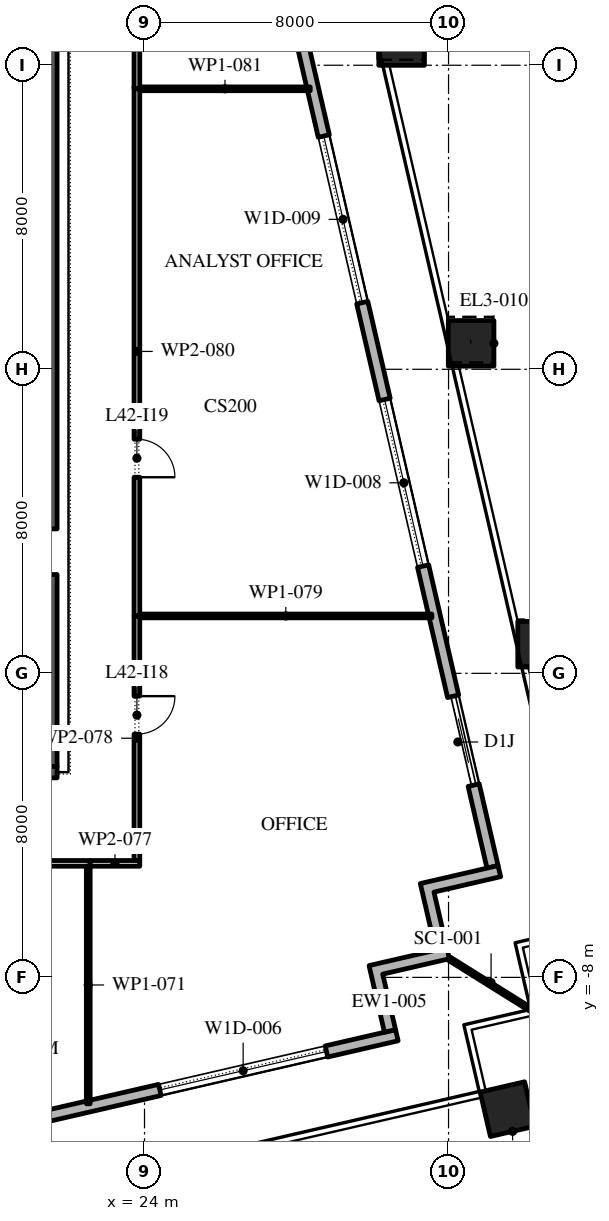
"""IFC4 building model, lengths in metres.
Left out: names, types, materials, properties, quantities, classifications, styles, units other than length and angle.
Written with IfcOpenShell. Run it as: python <this file> out.ifc"""

import sys

from ifc_helpers import new_model, si_unit, direction, frame, frame_2d, origin, origin_2d, place, context, subcontext, project, spatial, polyline, rectangle, outline, extrude, element, fill, save


model = new_model("IFC4")
c1 = context("Model", 3, precision=1e-05, world=origin(), true_north=direction((0.0, 1.0)))
c2 = subcontext(c1, "Body", "Model", "MODEL_VIEW")
j1 = project(units=[si_unit("LENGTHUNIT", "METRE"), si_unit("PLANEANGLEUNIT", "RADIAN")], contexts=[c1])
p1 = place(None, origin())
s1 = spatial("IfcSite", under=j1, at=p1, CompositionType="ELEMENT")
p2 = place(p1, origin())
s2 = spatial("IfcBuilding", under=s1, at=p2, CompositionType="ELEMENT")
p3 = place(p2, frame((0.0, 0.0, 192.6)))
s3 = spatial("IfcBuildingStorey", under=s2, at=p3, CompositionType="ELEMENT", Elevation=192.6)
p4 = place(p3, frame((33.551, -11.467, 0.0), z_axis=(0.0, 0.0, 1.0), x_axis=(0.974370064785, 0.224951054344, 0.0)))
e1 = element("IfcColumn", 1, at=p4, inside=s3, PredefinedType="COLUMN", context=c2, shape_type="SweptSolid", body=[
    extrude(rectangle(XDim=1.2, YDim=1.2, at=origin_2d()), origin(), (0.0, 0.0, 1.0), 4.2),
])
p5 = place(p3, frame((34.422, 0.767, 0.0), z_axis=(-0.00267376016, 0.011683169396, 0.9999281747), x_axis=(-0.974798272484, -0.223088161862, 0.0)))
e2 = element("IfcColumn", 2, at=p5, inside=s3, PredefinedType="COLUMN", context=c2, shape_type="SweptSolid", body=[
    extrude(rectangle(XDim=1.2, YDim=1.2, at=origin_2d()), origin(), (0.0, 0.0, 1.0), 4.2),
])
p6 = place(p3, frame((32.594, 8.683, 0.0), z_axis=(-0.005346368472, 0.023361305716, 0.999712791625), x_axis=(-0.974798272484, -0.223088161862, 0.0)))
e3 = element("IfcColumn", 3, at=p6, inside=s3, PredefinedType="COLUMN", context=c2, shape_type="SweptSolid", body=[
    extrude(rectangle(XDim=1.2, YDim=1.2, at=origin_2d()), origin(), (0.0, 0.0, 1.0), 4.201),
])
p7 = place(p3, frame((30.767, 16.598, 0.0), z_axis=(-0.0080747472, 0.035087390713, 0.999351626541), x_axis=(-0.974526982896, -0.224270282488, 0.0)))
e4 = element("IfcColumn", 4, at=p7, inside=s3, PredefinedType="COLUMN", context=c2, shape_type="SweptSolid", body=[
    extrude(rectangle(XDim=1.2, YDim=1.2, at=origin_2d()), origin(), (0.0, 0.0, 1.0), 4.203),
])
p8 = place(p3, frame((-17.592, -20.657, 0.0), z_axis=(0.0, 0.0, 1.0), x_axis=(0.974370243697, 0.224950279389, 0.0)))
e5 = element("IfcWall", 5, at=p8, inside=s3, PredefinedType="STANDARD", context=c2, shape_type="SweptSolid", body=[
    extrude(rectangle(XDim=49.5, YDim=0.3, at=frame_2d((24.75, 0.0))), origin(), (0.0, 0.0, 1.0), 4.0),
])
p9 = place(p8, frame((2.8, 0.0, 0.0)))
e6 = element("IfcOpeningElement", 6, at=p9, cuts=e5, PredefinedType="OPENING", context=c2, shape_type="SweptSolid", body=[
    extrude(rectangle(XDim=2.4, YDim=3.5, at=frame_2d((1.2, 1.75))), frame((0.0, 0.16, 0.0), z_axis=(0.0, -1.0, 0.0), x_axis=(1.0, 0.0, 0.0)), (0.0, 0.0, 1.0), 0.32),
])
p10 = place(p8, frame((9.9, 0.0, 0.45)))
e7 = element("IfcOpeningElement", 7, at=p10, cuts=e5, PredefinedType="OPENING", context=c2, shape_type="SweptSolid", body=[
    extrude(rectangle(XDim=4.5, YDim=2.575, at=frame_2d((2.25, 1.288))), frame((0.0, 0.16, 0.0), z_axis=(0.0, -1.0, 0.0), x_axis=(1.0, 0.0, 0.0)), (0.0, 0.0, 1.0), 0.32),
])
p11 = place(p8, frame((18.2, 0.0, 0.45)))
e8 = element("IfcOpeningElement", 8, at=p11, cuts=e5, PredefinedType="OPENING", context=c2, shape_type="SweptSolid", body=[
    extrude(rectangle(XDim=4.5, YDim=3.05, at=frame_2d((2.25, 1.525))), frame((0.0, 0.16, 0.0), z_axis=(0.0, -1.0, 0.0), x_axis=(1.0, 0.0, 0.0)), (0.0, 0.0, 1.0), 0.32),
])
p12 = place(p8, frame((26.5, 0.0, 0.45)))
e9 = element("IfcOpeningElement", 9, at=p12, cuts=e5, PredefinedType="OPENING", context=c2, shape_type="SweptSolid", body=[
    extrude(rectangle(XDim=4.5, YDim=2.75, at=frame_2d((2.25, 1.375))), frame((0.0, 0.16, 0.0), z_axis=(0.0, -1.0, 0.0), x_axis=(1.0, 0.0, 0.0)), (0.0, 0.0, 1.0), 0.32),
])
p13 = place(p8, frame((35.85, 0.0, 0.0)))
e10 = element("IfcOpeningElement", 10, at=p13, cuts=e5, PredefinedType="OPENING", context=c2, shape_type="SweptSolid", body=[
    extrude(rectangle(XDim=2.4, YDim=3.5, at=frame_2d((1.2, 1.75))), frame((0.0, 0.16, 0.0), z_axis=(0.0, -1.0, 0.0), x_axis=(1.0, 0.0, 0.0)), (0.0, 0.0, 1.0), 0.32),
])
p14 = place(p8, frame((43.1, 0.0, 0.45)))
e11 = element("IfcOpeningElement", 11, at=p14, cuts=e5, PredefinedType="OPENING", context=c2, shape_type="SweptSolid", body=[
    extrude(rectangle(XDim=4.5, YDim=2.875, at=frame_2d((2.25, 1.438))), frame((0.0, 0.16, 0.0), z_axis=(0.0, -1.0, 0.0), x_axis=(1.0, 0.0, 0.0)), (0.0, 0.0, 1.0), 0.32),
])
p15 = place(p3, frame((33.157, -5.092, 0.0), z_axis=(0.0, 0.0, 1.0), x_axis=(-0.224950279389, 0.974370243697, 0.0)))
e12 = element("IfcWall", 12, at=p15, inside=s3, PredefinedType="STANDARD", context=c2, shape_type="SweptSolid", body=[
    extrude(rectangle(XDim=49.5, YDim=0.3, at=frame_2d((24.75, 0.0))), origin(), (0.0, 0.0, 1.0), 4.0),
])
p16 = place(p15, frame((2.207, 0.0, 0.0)))
e13 = element("IfcOpeningElement", 13, at=p16, cuts=e12, PredefinedType="OPENING", context=c2, shape_type="SweptSolid", body=[
    extrude(rectangle(XDim=2.4, YDim=3.125, at=frame_2d((1.2, 1.562))), frame((0.0, 0.16, 0.0), z_axis=(0.0, -1.0, 0.0), x_axis=(1.0, 0.0, 0.0)), (0.0, 0.0, 1.0), 0.32),
])
p17 = place(p15, frame((8.121, 0.0, 0.45)))
e14 = element("IfcOpeningElement", 14, at=p17, cuts=e12, PredefinedType="OPENING", context=c2, shape_type="SweptSolid", body=[
    extrude(rectangle(XDim=4.5, YDim=2.875, at=frame_2d((2.25, 1.438))), frame((0.0, 0.16, 0.0), z_axis=(0.0, -1.0, 0.0), x_axis=(1.0, 0.0, 0.0)), (0.0, 0.0, 1.0), 0.32),
])
p18 = place(p15, frame((15.236, 0.0, 0.45)))
e15 = element("IfcOpeningElement", 15, at=p18, cuts=e12, PredefinedType="OPENING", context=c2, shape_type="SweptSolid", body=[
    extrude(rectangle(XDim=4.5, YDim=2.875, at=frame_2d((2.25, 1.438))), frame((0.0, 0.16, 0.0), z_axis=(0.0, -1.0, 0.0), x_axis=(1.0, 0.0, 0.0)), (0.0, 0.0, 1.0), 0.32),
])
p19 = place(p15, frame((22.35, 0.0, 0.45)))
e16 = element("IfcOpeningElement", 16, at=p19, cuts=e12, PredefinedType="OPENING", context=c2, shape_type="SweptSolid", body=[
    extrude(rectangle(XDim=4.5, YDim=3.0, at=frame_2d((2.25, 1.5))), frame((0.0, 0.16, 0.0), z_axis=(0.0, -1.0, 0.0), x_axis=(1.0, 0.0, 0.0)), (0.0, 0.0, 1.0), 0.32),
])
p20 = place(p15, frame((30.514, 0.0, 0.0)))
e17 = element("IfcOpeningElement", 17, at=p20, cuts=e12, PredefinedType="OPENING", context=c2, shape_type="SweptSolid", body=[
    extrude(rectangle(XDim=2.4, YDim=3.45, at=frame_2d((1.2, 1.725))), frame((0.0, 0.16, 0.0), z_axis=(0.0, -1.0, 0.0), x_axis=(1.0, 0.0, 0.0)), (0.0, 0.0, 1.0), 0.32),
])
p21 = place(p15, frame((36.579, 0.0, 0.45)))
e18 = element("IfcOpeningElement", 18, at=p21, cuts=e12, PredefinedType="OPENING", context=c2, shape_type="SweptSolid", body=[
    extrude(rectangle(XDim=4.5, YDim=3.05, at=frame_2d((2.25, 1.525))), frame((0.0, 0.16, 0.0), z_axis=(0.0, -1.0, 0.0), x_axis=(1.0, 0.0, 0.0)), (0.0, 0.0, 1.0), 0.32),
])
p22 = place(p15, frame((43.693, 0.0, 0.45)))
e19 = element("IfcOpeningElement", 19, at=p22, cuts=e12, PredefinedType="OPENING", context=c2, shape_type="SweptSolid", body=[
    extrude(rectangle(XDim=4.5, YDim=3.05, at=frame_2d((2.25, 1.525))), frame((0.0, 0.16, 0.0), z_axis=(0.0, -1.0, 0.0), x_axis=(1.0, 0.0, 0.0)), (0.0, 0.0, 1.0), 0.32),
])
p23 = place(p3, origin())
e20 = element("IfcWall", 20, at=p23, inside=s3, PredefinedType="STANDARD", context=c2, shape_type="SweptSolid", body=[
    extrude(outline(polyline([(31.662, -7.285), (31.257, -5.531), (33.303, -5.058), (33.371, -5.351), (31.617, -5.756), (32.022, -7.51), (30.268, -7.914), (30.605, -9.376), (30.313, -9.443), (29.908, -7.69), (31.662, -7.285)])), origin(), (0.0, 0.0, 1.0), 4.0),
])
p24 = place(p3, frame((32.022, -7.51, -0.05), z_axis=(0.0, 0.0, 1.0), x_axis=(0.848047176257, -0.529920736377, 0.0)))
e21 = element("IfcWall", 21, at=p24, inside=s3, PredefinedType="STANDARD", context=c2, shape_type="SweptSolid", body=[
    extrude(rectangle(XDim=2.526, YDim=0.1, at=frame_2d((1.263, 0.0))), origin(), (0.0, 0.0, 1.0), 4.05),
])
p25 = place(p3, frame((21.35, -2.45, 0.0), z_axis=(0.0, 0.0, 1.0), x_axis=(0.0, 1.0, 0.0)))
e22 = element("IfcWall", 22, at=p25, inside=s3, PredefinedType="SHEAR", context=c2, shape_type="SweptSolid", body=[
    extrude(rectangle(XDim=27.9, YDim=0.7, at=frame_2d((13.95, 0.0))), origin(), (0.0, 0.0, 1.0), 4.0),
])
p26 = place(p25, frame((5.05, 0.0, 0.0)))
e23 = element("IfcOpeningElement", 23, at=p26, cuts=e22, PredefinedType="OPENING", context=c2, shape_type="SweptSolid", body=[
    extrude(rectangle(XDim=1.2, YDim=2.1, at=frame_2d((0.6, 1.05))), frame((0.0, 0.36, 0.0), z_axis=(0.0, -1.0, 0.0), x_axis=(1.0, 0.0, 0.0)), (0.0, 0.0, 1.0), 0.72),
])
p27 = place(p25, frame((21.65, 0.0, 0.0)))
e24 = element("IfcOpeningElement", 24, at=p27, cuts=e22, PredefinedType="OPENING", context=c2, shape_type="SweptSolid", body=[
    extrude(rectangle(XDim=1.2, YDim=2.1, at=frame_2d((0.6, 1.05))), frame((0.0, 0.36, 0.0), z_axis=(0.0, -1.0, 0.0), x_axis=(1.0, 0.0, 0.0)), (0.0, 0.0, 1.0), 0.72),
])
p28 = place(p3, frame((10.3, -2.6, 0.0), z_axis=(0.0, 0.0, 1.0), x_axis=(1.0, 0.0, 0.0)))
e25 = element("IfcWall", 25, at=p28, inside=s3, PredefinedType="SHEAR", context=c2, shape_type="SweptSolid", body=[
    extrude(rectangle(XDim=11.4, YDim=0.3, at=frame_2d((5.7, 0.0))), origin(), (0.0, 0.0, 1.0), 4.0),
])
p29 = place(p3, frame((22.57, -5.0, 0.0), z_axis=(0.0, 0.0, 1.0), x_axis=(-1.0, 0.0, 0.0)))
e26 = element("IfcWall", 26, at=p29, inside=s3, PredefinedType="PARTITIONING", context=c2, shape_type="SweptSolid", body=[
    extrude(rectangle(XDim=8.14, YDim=0.15, at=frame_2d((4.07, 0.0))), origin(), (0.0, 0.0, 1.0), 4.0),
])
p30 = place(p29, frame((3.49, 0.0, 0.0)))
e27 = element("IfcOpeningElement", 27, at=p30, cuts=e26, PredefinedType="OPENING", context=c2, shape_type="SweptSolid", body=[
    extrude(rectangle(XDim=1.0, YDim=2.1, at=frame_2d((0.5, 1.05))), frame((0.0, 0.085, 0.0), z_axis=(0.0, -1.0, 0.0), x_axis=(1.0, 0.0, 0.0)), (0.0, 0.0, 1.0), 0.17),
])
p31 = place(p3, frame((22.52, -5.075, 0.0), z_axis=(0.0, 0.0, 1.0), x_axis=(0.0, -1.0, 0.0)))
e28 = element("IfcWall", 28, at=p31, inside=s3, PredefinedType="PARTITIONING", context=c2, shape_type="SweptSolid", body=[
    extrude(rectangle(XDim=6.25, YDim=0.1, at=frame_2d((3.125, 0.0))), origin(), (0.0, 0.0, 1.0), 4.0),
])
p32 = place(p3, frame((23.875, -5.0, 0.0), z_axis=(0.0, 0.0, 1.0), x_axis=(-1.0, 0.0, 0.0)))
e29 = element("IfcWall", 29, at=p32, inside=s3, PredefinedType="PARTITIONING", context=c2, shape_type="SweptSolid", body=[
    extrude(rectangle(XDim=1.305, YDim=0.15, at=frame_2d((0.652, 0.0))), origin(), (0.0, 0.0, 1.0), 4.0),
])
p33 = place(p3, frame((23.8, 1.51, 0.0), z_axis=(0.0, 0.0, 1.0), x_axis=(0.0, -1.0, 0.0)))
e30 = element("IfcWall", 30, at=p33, inside=s3, PredefinedType="PARTITIONING", context=c2, shape_type="SweptSolid", body=[
    extrude(rectangle(XDim=6.435, YDim=0.15, at=frame_2d((3.218, 0.0))), origin(), (0.0, 0.0, 1.0), 4.0),
])
p34 = place(p33, frame((2.11, 0.0, 0.0)))
e31 = element("IfcOpeningElement", 31, at=p34, cuts=e30, PredefinedType="OPENING", context=c2, shape_type="SweptSolid", body=[
    extrude(rectangle(XDim=1.0, YDim=2.1, at=frame_2d((0.5, 1.05))), frame((0.0, 0.085, 0.0), z_axis=(0.0, -1.0, 0.0), x_axis=(1.0, 0.0, 0.0)), (0.0, 0.0, 1.0), 0.17),
])
p35 = place(p3, frame((23.875, 1.51, 0.0), z_axis=(0.0, 0.0, 1.0), x_axis=(1.0, 0.0, 0.0)))
e32 = element("IfcWall", 32, at=p35, inside=s3, PredefinedType="PARTITIONING", context=c2, shape_type="SweptSolid", body=[
    extrude(rectangle(XDim=7.687, YDim=0.1, at=frame_2d((3.844, 0.0))), origin(), (0.0, 0.0, 1.0), 4.0),
])
p36 = place(p3, frame((23.8, 15.43, 0.0), z_axis=(0.0, 0.0, 1.0), x_axis=(0.0, -1.0, 0.0)))
e33 = element("IfcWall", 33, at=p36, inside=s3, PredefinedType="PARTITIONING", context=c2, shape_type="SweptSolid", body=[
    extrude(rectangle(XDim=13.92, YDim=0.15, at=frame_2d((6.96, 0.0))), origin(), (0.0, 0.0, 1.0), 4.0),
])
p37 = place(p36, frame((9.27, 0.0, 0.0)))
e34 = element("IfcOpeningElement", 34, at=p37, cuts=e33, PredefinedType="OPENING", context=c2, shape_type="SweptSolid", body=[
    extrude(rectangle(XDim=1.0, YDim=2.1, at=frame_2d((0.5, 1.05))), frame((0.0, 0.085, 0.0), z_axis=(0.0, -1.0, 0.0), x_axis=(1.0, 0.0, 0.0)), (0.0, 0.0, 1.0), 0.17),
])
p38 = place(p3, frame((23.875, 15.38, 0.0), z_axis=(0.0, 0.0, 1.0), x_axis=(1.0, 0.0, 0.0)))
e35 = element("IfcWall", 35, at=p38, inside=s3, PredefinedType="PARTITIONING", context=c2, shape_type="SweptSolid", body=[
    extrude(rectangle(XDim=4.485, YDim=0.1, at=frame_2d((2.243, 0.0))), origin(), (0.0, 0.0, 1.0), 4.0),
])
p39 = place(p3, frame((23.8, 23.54, 0.0), z_axis=(0.0, 0.0, 1.0), x_axis=(0.0, -1.0, 0.0)))
e36 = element("IfcWall", 36, at=p39, inside=s3, PredefinedType="PARTITIONING", context=c2, shape_type="SweptSolid", body=[
    extrude(rectangle(XDim=8.16, YDim=0.15, at=frame_2d((4.08, 0.0))), origin(), (0.0, 0.0, 1.0), 4.0),
])
p40 = place(p39, frame((3.51, 0.0, 0.0)))
e37 = element("IfcOpeningElement", 37, at=p40, cuts=e36, PredefinedType="OPENING", context=c2, shape_type="SweptSolid", body=[
    extrude(rectangle(XDim=1.0, YDim=2.1, at=frame_2d((0.5, 1.05))), frame((0.0, 0.085, 0.0), z_axis=(0.0, -1.0, 0.0), x_axis=(1.0, 0.0, 0.0)), (0.0, 0.0, 1.0), 0.17),
])
p41 = place(p14, origin())
e38 = element("IfcWindow", 38, at=p41, inside=s3, PartitioningType="DOUBLE_PANEL_VERTICAL", PredefinedType="WINDOW", context=c2, shape_type="SweptSolid", body=[
    extrude(rectangle(XDim=4.5, YDim=2.875, at=frame_2d((2.25, 1.438))), frame((0.0, 0.03, 0.0), z_axis=(0.0, -1.0, 0.0), x_axis=(1.0, 0.0, 0.0)), (0.0, 0.0, 1.0), 0.06),
])
fill(e11, e38)
p42 = place(p16, origin())
e39 = element("IfcDoor", 39, at=p42, inside=s3, OperationType="DOUBLE_DOOR_SLIDING", PredefinedType="DOOR", context=c2, shape_type="SweptSolid", body=[
    extrude(rectangle(XDim=2.4, YDim=3.125, at=frame_2d((1.2, 1.562))), frame((0.0, 0.025, 0.0), z_axis=(0.0, -1.0, 0.0), x_axis=(1.0, 0.0, 0.0)), (0.0, 0.0, 1.0), 0.05),
])
fill(e13, e39)
p43 = place(p17, origin())
e40 = element("IfcWindow", 40, at=p43, inside=s3, PartitioningType="DOUBLE_PANEL_VERTICAL", PredefinedType="WINDOW", context=c2, shape_type="SweptSolid", body=[
    extrude(rectangle(XDim=4.5, YDim=2.875, at=frame_2d((2.25, 1.438))), frame((0.0, 0.03, 0.0), z_axis=(0.0, -1.0, 0.0), x_axis=(1.0, 0.0, 0.0)), (0.0, 0.0, 1.0), 0.06),
])
fill(e14, e40)
p44 = place(p18, origin())
e41 = element("IfcWindow", 41, at=p44, inside=s3, PartitioningType="DOUBLE_PANEL_VERTICAL", PredefinedType="WINDOW", context=c2, shape_type="SweptSolid", body=[
    extrude(rectangle(XDim=4.5, YDim=2.875, at=frame_2d((2.25, 1.438))), frame((0.0, 0.03, 0.0), z_axis=(0.0, -1.0, 0.0), x_axis=(1.0, 0.0, 0.0)), (0.0, 0.0, 1.0), 0.06),
])
fill(e15, e41)
p45 = place(p34, origin())
e42 = element("IfcDoor", 42, at=p45, inside=s3, OperationType="SINGLE_SWING_RIGHT", PredefinedType="DOOR", context=c2, shape_type="SweptSolid", body=[
    extrude(rectangle(XDim=1.0, YDim=2.1, at=frame_2d((0.5, 1.05))), frame((0.0, 0.025, 0.0), z_axis=(0.0, -1.0, 0.0), x_axis=(1.0, 0.0, 0.0)), (0.0, 0.0, 1.0), 0.05),
])
fill(e31, e42)
p46 = place(p37, origin())
e43 = element("IfcDoor", 43, at=p46, inside=s3, OperationType="SINGLE_SWING_LEFT", PredefinedType="DOOR", context=c2, shape_type="SweptSolid", body=[
    extrude(rectangle(XDim=1.0, YDim=2.1, at=frame_2d((0.5, 1.05))), frame((0.0, 0.025, 0.0), z_axis=(0.0, -1.0, 0.0), x_axis=(1.0, 0.0, 0.0)), (0.0, 0.0, 1.0), 0.05),
])
fill(e34, e43)
save(model, sys.argv[1])
